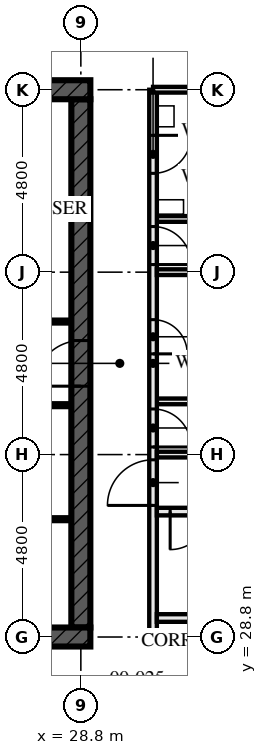
"""IFC4 building model, lengths in metres.
Left out: names, types, materials, properties, quantities, classifications, styles, units other than length and angle.
Written with IfcOpenShell. Run it as: python <this file> out.ifc"""

import sys

from ifc_helpers import new_model, si_unit, direction, frame, frame_2d, origin, place, context, subcontext, project, spatial, rectangle, extrude, element, fill, save


model = new_model("IFC4")
c1 = context("Model", 3, precision=1e-05, world=origin(), true_north=direction((0.0, 1.0)))
c2 = subcontext(c1, "Body", "Model", "MODEL_VIEW")
j1 = project(units=[si_unit("LENGTHUNIT", "METRE"), si_unit("PLANEANGLEUNIT", "RADIAN")], contexts=[c1])
p1 = place(None, origin())
s1 = spatial("IfcSite", under=j1, at=p1, CompositionType="ELEMENT")
p2 = place(p1, origin())
s2 = spatial("IfcBuilding", under=s1, at=p2, CompositionType="ELEMENT")
p3 = place(p2, origin())
s3 = spatial("IfcBuildingStorey", under=s2, at=p3, CompositionType="ELEMENT", Elevation=0.0)
p4 = place(p3, frame((14.15, 28.8, -1.8), z_axis=(0.0, 0.0, 1.0), x_axis=(1.0, 0.0, 0.0)))
e1 = element("IfcWall", 1, at=p4, inside=s3, PredefinedType="SHEAR", context=c2, shape_type="SweptSolid", body=[
    extrude(rectangle(XDim=14.9, YDim=0.5, at=frame_2d((7.45, 0.0))), origin(), (0.0, 0.0, 1.0), 6.13),
])
p5 = place(p4, frame((6.85, 0.0, 1.8)))
e2 = element("IfcOpeningElement", 2, at=p5, cuts=e1, PredefinedType="OPENING", context=c2, shape_type="SweptSolid", body=[
    extrude(rectangle(XDim=1.2, YDim=2.1, at=frame_2d((0.6, 1.05))), frame((0.0, 0.26, 0.0), z_axis=(0.0, -1.0, 0.0), x_axis=(1.0, 0.0, 0.0)), (0.0, 0.0, 1.0), 0.521),
])
p6 = place(p3, frame((29.05, 43.2, -1.8), z_axis=(0.0, 0.0, 1.0), x_axis=(-1.0, 0.0, 0.0)))
e3 = element("IfcWall", 3, at=p6, inside=s3, PredefinedType="SHEAR", context=c2, shape_type="SweptSolid", body=[
    extrude(rectangle(XDim=14.9, YDim=0.5, at=frame_2d((7.45, 0.0))), origin(), (0.0, 0.0, 1.0), 6.13),
])
p7 = place(p6, frame((6.85, 0.0, 1.8)))
e4 = element("IfcOpeningElement", 4, at=p7, cuts=e3, PredefinedType="OPENING", context=c2, shape_type="SweptSolid", body=[
    extrude(rectangle(XDim=1.2, YDim=2.1, at=frame_2d((0.6, 1.05))), frame((0.0, 0.26, 0.0), z_axis=(0.0, -1.0, 0.0), x_axis=(1.0, 0.0, 0.0)), (0.0, 0.0, 1.0), 0.521),
])
p8 = place(p3, frame((28.8, 29.05, -1.8), z_axis=(0.0, 0.0, 1.0), x_axis=(0.0, 1.0, 0.0)))
e5 = element("IfcWall", 5, at=p8, inside=s3, PredefinedType="SHEAR", context=c2, shape_type="SweptSolid", body=[
    extrude(rectangle(XDim=13.9, YDim=0.5, at=frame_2d((6.95, 0.0))), origin(), (0.0, 0.0, 1.0), 6.13),
])
p9 = place(p8, frame((6.35, 0.0, 1.8)))
e6 = element("IfcOpeningElement", 6, at=p9, cuts=e5, PredefinedType="OPENING", context=c2, shape_type="SweptSolid", body=[
    extrude(rectangle(XDim=1.2, YDim=2.1, at=frame_2d((0.6, 1.05))), frame((0.0, 0.26, 0.0), z_axis=(0.0, -1.0, 0.0), x_axis=(1.0, 0.0, 0.0)), (0.0, 0.0, 1.0), 0.521),
])
p10 = place(p3, frame((35.5, 29.3, 0.0), z_axis=(0.0, 0.0, 1.0), x_axis=(-1.0, 0.0, 0.0)))
e7 = element("IfcWall", 7, at=p10, inside=s3, PredefinedType="SOLIDWALL", context=c2, shape_type="SweptSolid", body=[
    extrude(rectangle(XDim=4.7, YDim=0.2, at=frame_2d((2.35, 0.0))), origin(), (0.0, 0.0, 1.0), 3.99),
])
p11 = place(p3, frame((35.5, 32.1, 0.0), z_axis=(0.0, 0.0, 1.0), x_axis=(-1.0, 0.0, 0.0)))
e8 = element("IfcWall", 8, at=p11, inside=s3, PredefinedType="SOLIDWALL", context=c2, shape_type="SweptSolid", body=[
    extrude(rectangle(XDim=4.7, YDim=0.2, at=frame_2d((2.35, 0.0))), origin(), (0.0, 0.0, 1.0), 3.99),
])
p12 = place(p11, frame((3.35, 0.0, 0.0)))
e9 = element("IfcOpeningElement", 9, at=p12, cuts=e8, PredefinedType="OPENING", context=c2, shape_type="SweptSolid", body=[
    extrude(rectangle(XDim=1.0, YDim=2.1, at=frame_2d((0.5, 1.05))), frame((0.0, 0.111, 0.0), z_axis=(0.0, -1.0, 0.0), x_axis=(1.0, 0.0, 0.0)), (0.0, 0.0, 1.0), 0.221),
])
for number, where, z_axis, x_axis in (
    (10, (33.1, 35.0, 0.0), (0.0, 0.0, 1.0), (-1.0, 0.0, 0.0)),
    (11, (33.1, 39.8, 0.0), (0.0, 0.0, 1.0), (-1.0, 0.0, 0.0)),
):
    element("IfcWall", number, at=place(p3, frame(where, z_axis=z_axis, x_axis=x_axis)), inside=s3, PredefinedType="PARTITIONING", context=c2, shape_type="SweptSolid", body=[
        extrude(rectangle(XDim=2.3, YDim=0.15, at=frame_2d((1.15, 0.0))), origin(), (0.0, 0.0, 1.0), 4.33),
    ])
for number, where, z_axis, x_axis in (
    (12, (42.805, 33.6, 0.0), (0.0, 0.0, 1.0), (-1.0, 0.0, 0.0)),
    (13, (42.805, 38.4, 0.0), (0.0, 0.0, 1.0), (-1.0, 0.0, 0.0)),
):
    element("IfcWall", number, at=place(p3, frame(where, z_axis=z_axis, x_axis=x_axis)), inside=s3, PredefinedType="PARTITIONING", context=c2, shape_type="SweptSolid", body=[
        extrude(rectangle(XDim=12.005, YDim=0.15, at=frame_2d((6.002, 0.0))), origin(), (0.0, 0.0, 1.0), 3.55),
    ])
p13 = place(p3, frame((30.7, 28.8, 0.0), z_axis=(0.0, 0.0, 1.0), x_axis=(0.0, 1.0, 0.0)))
e14 = element("IfcWall", 14, at=p13, inside=s3, PredefinedType="PARTITIONING", context=c2, shape_type="SweptSolid", body=[
    extrude(rectangle(XDim=14.4, YDim=0.2, at=frame_2d((7.2, 0.0))), origin(), (0.0, 0.0, 1.0), 3.55),
])
p14 = place(p13, frame((3.462, 0.0, 0.0)))
e15 = element("IfcOpeningElement", 15, at=p14, cuts=e14, PredefinedType="OPENING", context=c2, shape_type="SweptSolid", body=[
    extrude(rectangle(XDim=1.2, YDim=2.4, at=frame_2d((0.6, 1.2))), frame((0.0, 0.111, 0.0), z_axis=(0.0, -1.0, 0.0), x_axis=(1.0, 0.0, 0.0)), (0.0, 0.0, 1.0), 0.221),
])
p15 = place(p13, frame((5.0, 0.0, 0.0)))
e16 = element("IfcOpeningElement", 16, at=p15, cuts=e14, PredefinedType="OPENING", context=c2, shape_type="SweptSolid", body=[
    extrude(rectangle(XDim=1.0, YDim=2.4, at=frame_2d((0.5, 1.2))), frame((0.0, 0.111, 0.0), z_axis=(0.0, -1.0, 0.0), x_axis=(1.0, 0.0, 0.0)), (0.0, 0.0, 1.0), 0.221),
])
p16 = place(p13, frame((9.8, 0.0, 0.0)))
e17 = element("IfcOpeningElement", 17, at=p16, cuts=e14, PredefinedType="OPENING", context=c2, shape_type="SweptSolid", body=[
    extrude(rectangle(XDim=1.0, YDim=2.4, at=frame_2d((0.5, 1.2))), frame((0.0, 0.111, 0.0), z_axis=(0.0, -1.0, 0.0), x_axis=(1.0, 0.0, 0.0)), (0.0, 0.0, 1.0), 0.221),
])
p17 = place(p13, frame((7.45, 0.0, 0.0)))
e18 = element("IfcOpeningElement", 18, at=p17, cuts=e14, PredefinedType="OPENING", context=c2, shape_type="SweptSolid", body=[
    extrude(rectangle(XDim=0.9, YDim=2.1, at=frame_2d((0.45, 1.05))), frame((0.0, 0.111, 0.0), z_axis=(0.0, -1.0, 0.0), x_axis=(1.0, 0.0, 0.0)), (0.0, 0.0, 1.0), 0.221),
])
p18 = place(p13, frame((12.2, 0.0, 0.0)))
e19 = element("IfcOpeningElement", 19, at=p18, cuts=e14, PredefinedType="OPENING", context=c2, shape_type="SweptSolid", body=[
    extrude(rectangle(XDim=1.0, YDim=2.1, at=frame_2d((0.5, 1.05))), frame((0.0, 0.111, 0.0), z_axis=(0.0, -1.0, 0.0), x_axis=(1.0, 0.0, 0.0)), (0.0, 0.0, 1.0), 0.221),
])
p19 = place(p3, frame((23.05, 34.9, -1.8), z_axis=(0.0, 0.0, 1.0), x_axis=(1.0, 0.0, 0.0)))
e20 = element("IfcWall", 20, at=p19, inside=s3, PredefinedType="SOLIDWALL", context=c2, shape_type="SweptSolid", body=[
    extrude(rectangle(XDim=5.5, YDim=0.1, at=frame_2d((2.75, 0.0))), origin(), (0.0, 0.0, 1.0), 6.13),
])
p20 = place(p19, frame((0.85, 0.0, 1.8)))
e21 = element("IfcOpeningElement", 21, at=p20, cuts=e20, PredefinedType="OPENING", context=c2, shape_type="SweptSolid", body=[
    extrude(rectangle(XDim=1.0, YDim=2.1, at=frame_2d((0.5, 1.05))), frame((0.0, 0.061, 0.0), z_axis=(0.0, -1.0, 0.0), x_axis=(1.0, 0.0, 0.0)), (0.0, 0.0, 1.0), 0.121),
])
p21 = place(p19, frame((3.625, 0.0, 1.8)))
e22 = element("IfcOpeningElement", 22, at=p21, cuts=e20, PredefinedType="OPENING", context=c2, shape_type="SweptSolid", body=[
    extrude(rectangle(XDim=1.0, YDim=2.1, at=frame_2d((0.5, 1.05))), frame((0.0, 0.061, 0.0), z_axis=(0.0, -1.0, 0.0), x_axis=(1.0, 0.0, 0.0)), (0.0, 0.0, 1.0), 0.121),
])
p22 = place(p3, frame((22.65, 37.1, -1.8), z_axis=(0.0, 0.0, 1.0), x_axis=(1.0, 0.0, 0.0)))
e23 = element("IfcWall", 23, at=p22, inside=s3, PredefinedType="SOLIDWALL", context=c2, shape_type="SweptSolid", body=[
    extrude(rectangle(XDim=5.9, YDim=0.1, at=frame_2d((2.95, 0.0))), origin(), (0.0, 0.0, 1.0), 6.13),
])
p23 = place(p22, frame((4.6, 0.0, 1.8)))
e24 = element("IfcOpeningElement", 24, at=p23, cuts=e23, PredefinedType="OPENING", context=c2, shape_type="SweptSolid", body=[
    extrude(rectangle(XDim=0.7, YDim=2.1, at=frame_2d((0.35, 1.05))), frame((0.0, 0.061, 0.0), z_axis=(0.0, -1.0, 0.0), x_axis=(1.0, 0.0, 0.0)), (0.0, 0.0, 1.0), 0.121),
])
p24 = place(p3, frame((23.15, 31.9, -1.8), z_axis=(0.0, 0.0, 1.0), x_axis=(1.0, 0.0, 0.0)))
e25 = element("IfcWall", 25, at=p24, inside=s3, PredefinedType="SOLIDWALL", context=c2, shape_type="SweptSolid", body=[
    extrude(rectangle(XDim=5.4, YDim=0.1, at=frame_2d((2.7, 0.0))), origin(), (0.0, 0.0, 1.0), 6.13),
])
for number, where, z_axis, x_axis in (
    (26, (33.205, 28.8, 0.0), (0.0, 0.0, 1.0), (-1.0, 0.0, 0.0)),
    (27, (33.205, 43.2, 0.0), (0.0, 0.0, 1.0), (-1.0, 0.0, 0.0)),
):
    element("IfcWall", number, at=place(p3, frame(where, z_axis=z_axis, x_axis=x_axis)), inside=s3, PredefinedType="PARTITIONING", context=c2, shape_type="SweptSolid", body=[
        extrude(rectangle(XDim=2.505, YDim=0.15, at=frame_2d((1.252, 0.0))), origin(), (0.0, 0.0, 1.0), 3.32),
    ])
p25 = place(p12, origin())
e28 = element("IfcDoor", 28, at=p25, inside=s3, OperationType="SINGLE_SWING_LEFT", PredefinedType="DOOR", context=c2, shape_type="SweptSolid", body=[
    extrude(rectangle(XDim=1.0, YDim=2.1, at=frame_2d((0.5, 1.05))), frame((0.0, 0.032, 0.0), z_axis=(0.0, -1.0, 0.0), x_axis=(1.0, 0.0, 0.0)), (0.0, 0.0, 1.0), 0.064),
])
fill(e9, e28)
p26 = place(p14, origin())
e29 = element("IfcDoor", 29, at=p26, inside=s3, OperationType="SINGLE_SWING_RIGHT", PredefinedType="DOOR", context=c2, shape_type="SweptSolid", body=[
    extrude(rectangle(XDim=1.2, YDim=2.4, at=frame_2d((0.6, 1.2))), frame((0.0, 0.027, 0.0), z_axis=(0.0, -1.0, 0.0), x_axis=(1.0, 0.0, 0.0)), (0.0, 0.0, 1.0), 0.054),
])
fill(e15, e29)
p27 = place(p15, frame((1.0, 0.0, 0.0), z_axis=(0.0, 0.0, 1.0), x_axis=(-1.0, 0.0, 0.0)))
e30 = element("IfcDoor", 30, at=p27, inside=s3, OperationType="SINGLE_SWING_LEFT", PredefinedType="DOOR", context=c2, shape_type="SweptSolid", body=[
    extrude(rectangle(XDim=1.0, YDim=2.4, at=frame_2d((0.5, 1.2))), frame((0.0, 0.027, 0.0), z_axis=(0.0, -1.0, 0.0), x_axis=(1.0, 0.0, 0.0)), (0.0, 0.0, 1.0), 0.054),
])
fill(e16, e30)
p28 = place(p16, frame((1.0, 0.0, 0.0), z_axis=(0.0, 0.0, 1.0), x_axis=(-1.0, 0.0, 0.0)))
e31 = element("IfcDoor", 31, at=p28, inside=s3, OperationType="SINGLE_SWING_LEFT", PredefinedType="DOOR", context=c2, shape_type="SweptSolid", body=[
    extrude(rectangle(XDim=1.0, YDim=2.4, at=frame_2d((0.5, 1.2))), frame((0.0, 0.027, 0.0), z_axis=(0.0, -1.0, 0.0), x_axis=(1.0, 0.0, 0.0)), (0.0, 0.0, 1.0), 0.054),
])
fill(e17, e31)
p29 = place(p17, frame((0.9, 0.0, 0.0), z_axis=(0.0, 0.0, 1.0), x_axis=(-1.0, 0.0, 0.0)))
e32 = element("IfcDoor", 32, at=p29, inside=s3, OperationType="SINGLE_SWING_LEFT", PredefinedType="DOOR", context=c2, shape_type="SweptSolid", body=[
    extrude(rectangle(XDim=0.9, YDim=2.1, at=frame_2d((0.45, 1.05))), frame((0.0, 0.027, 0.0), z_axis=(0.0, -1.0, 0.0), x_axis=(1.0, 0.0, 0.0)), (0.0, 0.0, 1.0), 0.054),
])
fill(e18, e32)
p30 = place(p18, frame((1.0, 0.0, 0.0), z_axis=(0.0, 0.0, 1.0), x_axis=(-1.0, 0.0, 0.0)))
e33 = element("IfcDoor", 33, at=p30, inside=s3, OperationType="SINGLE_SWING_RIGHT", PredefinedType="DOOR", context=c2, shape_type="SweptSolid", body=[
    extrude(rectangle(XDim=1.0, YDim=2.1, at=frame_2d((0.5, 1.05))), frame((0.0, 0.027, 0.0), z_axis=(0.0, -1.0, 0.0), x_axis=(1.0, 0.0, 0.0)), (0.0, 0.0, 1.0), 0.054),
])
fill(e19, e33)
p31 = place(p9, origin())
e34 = element("IfcDoor", 34, at=p31, inside=s3, OperationType="SINGLE_SWING_LEFT", PredefinedType="DOOR", context=c2, shape_type="SweptSolid", body=[
    extrude(rectangle(XDim=1.2, YDim=2.1, at=frame_2d((0.6, 1.05))), frame((0.0, 0.027, 0.0), z_axis=(0.0, -1.0, 0.0), x_axis=(1.0, 0.0, 0.0)), (0.0, 0.0, 1.0), 0.054),
])
fill(e6, e34)
save(model, sys.argv[1])
